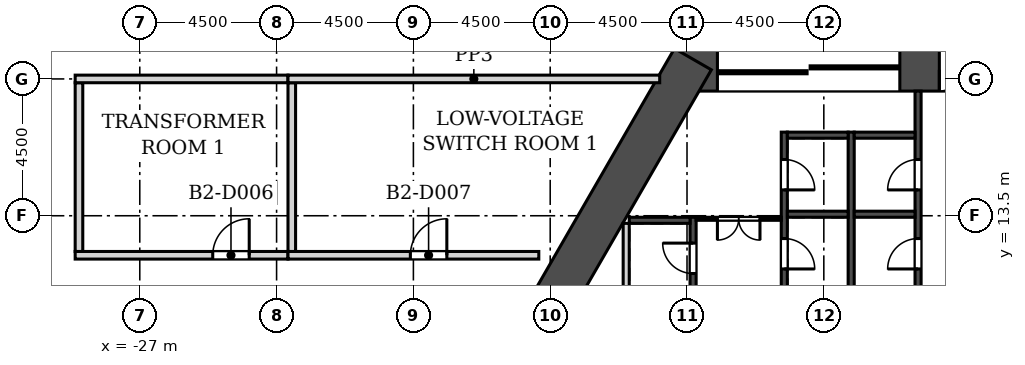
"""IFC4 building model, lengths in metres.
Left out: names, types, materials, properties, quantities, classifications, styles, units other than length and angle.
Written with IfcOpenShell. Run it as: python <this file> out.ifc"""

import sys

from ifc_helpers import new_model, si_unit, direction, frame, frame_2d, origin, place, context, subcontext, project, spatial, rectangle, extrude, element, fill, save


model = new_model("IFC4")
c1 = context("Model", 3, precision=1e-05, world=origin(), true_north=direction((0.0, 1.0)))
c2 = subcontext(c1, "Body", "Model", "MODEL_VIEW")
j1 = project(units=[si_unit("LENGTHUNIT", "METRE"), si_unit("PLANEANGLEUNIT", "RADIAN")], contexts=[c1])
p1 = place(None, origin())
s1 = spatial("IfcSite", under=j1, at=p1, CompositionType="ELEMENT")
p2 = place(p1, origin())
s2 = spatial("IfcBuilding", under=s1, at=p2, CompositionType="ELEMENT")
p3 = place(p2, frame((0.0, 0.0, -14.0)))
s3 = spatial("IfcBuildingStorey", under=s2, at=p3, CompositionType="ELEMENT", Elevation=-14.0)
p4 = place(p3, frame((-4.856, 74.528, -0.4), z_axis=(0.0, 0.0, 1.0), x_axis=(-0.499999312333, -0.866025800809, 0.0)))
e1 = element("IfcWall", 1, at=p4, inside=s3, PredefinedType="SOLIDWALL", context=c2, shape_type="SweptSolid", body=[
    extrude(rectangle(XDim=76.231, YDim=0.6, at=frame_2d((38.115, 0.0))), origin(), (0.0, 0.0, 1.0), 6.4),
])
p5 = place(p3, frame((9.412, 18.3, 0.0), z_axis=(0.0, 0.0, 1.0), x_axis=(-1.0, 0.0, 0.0)))
e2 = element("IfcWall", 2, at=p5, inside=s3, PredefinedType="SHEAR", context=c2, shape_type="SweptSolid", body=[
    extrude(rectangle(XDim=18.823, YDim=1.4, at=frame_2d((9.412, 0.0))), origin(), (0.0, 0.0, 1.0), 6.0),
])
p6 = place(p5, frame((8.711, 0.0, 0.0)))
e3 = element("IfcOpeningElement", 3, at=p6, cuts=e2, PredefinedType="OPENING", context=c2, shape_type="SweptSolid", body=[
    extrude(rectangle(XDim=1.4, YDim=2.1, at=frame_2d((0.7, 1.05))), frame((0.0, 0.71, 0.0), z_axis=(0.0, -1.0, 0.0), x_axis=(1.0, 0.0, 0.0)), (0.0, 0.0, 1.0), 1.42),
])
p7 = place(p5, frame((11.412, 0.0, 0.0)))
e4 = element("IfcOpeningElement", 4, at=p7, cuts=e2, PredefinedType="OPENING", context=c2, shape_type="SweptSolid", body=[
    extrude(rectangle(XDim=6.0, YDim=2.4, at=frame_2d((3.0, 1.2))), frame((0.0, 0.71, 0.0), z_axis=(0.0, -1.0, 0.0), x_axis=(1.0, 0.0, 0.0)), (0.0, 0.0, 1.0), 1.42),
])
p8 = place(p5, frame((1.412, 0.0, 0.0)))
e5 = element("IfcOpeningElement", 5, at=p8, cuts=e2, PredefinedType="OPENING", context=c2, shape_type="SweptSolid", body=[
    extrude(rectangle(XDim=6.0, YDim=2.4, at=frame_2d((3.0, 1.2))), frame((0.0, 0.71, 0.0), z_axis=(0.0, -1.0, 0.0), x_axis=(1.0, 0.0, 0.0)), (0.0, 0.0, 1.0), 1.42),
])
p9 = place(p3, frame((-8.805, 18.65, 0.0), z_axis=(0.0, 0.0, 1.0), x_axis=(-0.50000187635, -0.866024320471, 0.0)))
e6 = element("IfcWall", 6, at=p9, inside=s3, PredefinedType="SHEAR", context=c2, shape_type="SweptSolid", body=[
    extrude(rectangle(XDim=9.177, YDim=1.4, at=frame_2d((4.588, 0.0))), origin(), (0.0, 0.0, 1.0), 6.0),
])
p10 = place(p3, frame((-11.0, 5.85, 0.0), z_axis=(0.0, 0.0, 1.0), x_axis=(0.0, 1.0, 0.0)))
e7 = element("IfcWall", 7, at=p10, inside=s3, PredefinedType="SOLIDWALL", context=c2, shape_type="SweptSolid", body=[
    extrude(rectangle(XDim=7.4, YDim=0.2, at=frame_2d((3.7, 0.0))), origin(), (0.0, 0.0, 1.0), 5.65),
])
p11 = place(p3, frame((-8.8, 8.25, 0.0), z_axis=(0.0, 0.0, 1.0), x_axis=(0.0, 1.0, 0.0)))
e8 = element("IfcWall", 8, at=p11, inside=s3, PredefinedType="SOLIDWALL", context=c2, shape_type="SweptSolid", body=[
    extrude(rectangle(XDim=5.2, YDim=0.2, at=frame_2d((2.6, 0.0))), origin(), (0.0, 0.0, 1.0), 5.65),
])
p12 = place(p11, frame((0.85, 0.0, 0.0)))
e9 = element("IfcOpeningElement", 9, at=p12, cuts=e8, PredefinedType="OPENING", context=c2, shape_type="SweptSolid", body=[
    extrude(rectangle(XDim=1.0, YDim=2.1, at=frame_2d((0.5, 1.05))), frame((0.0, 0.11, 0.0), z_axis=(0.0, -1.0, 0.0), x_axis=(1.0, 0.0, 0.0)), (0.0, 0.0, 1.0), 0.22),
])
p13 = place(p11, frame((3.35, 0.0, 0.0)))
e10 = element("IfcOpeningElement", 10, at=p13, cuts=e8, PredefinedType="OPENING", context=c2, shape_type="SweptSolid", body=[
    extrude(rectangle(XDim=1.0, YDim=2.1, at=frame_2d((0.5, 1.05))), frame((0.0, 0.11, 0.0), z_axis=(0.0, -1.0, 0.0), x_axis=(1.0, 0.0, 0.0)), (0.0, 0.0, 1.0), 0.22),
])
p14 = place(p3, frame((-5.8, 8.25, 0.0), z_axis=(0.0, 0.0, 1.0), x_axis=(0.0, 1.0, 0.0)))
e11 = element("IfcWall", 11, at=p14, inside=s3, PredefinedType="SOLIDWALL", context=c2, shape_type="SweptSolid", body=[
    extrude(rectangle(XDim=8.0, YDim=0.2, at=frame_2d((4.0, 0.0))), origin(), (0.0, 0.0, 1.0), 5.65),
])
p15 = place(p14, frame((0.9, 0.0, 0.0)))
e12 = element("IfcOpeningElement", 12, at=p15, cuts=e11, PredefinedType="OPENING", context=c2, shape_type="SweptSolid", body=[
    extrude(rectangle(XDim=1.0, YDim=2.1, at=frame_2d((0.5, 1.05))), frame((0.0, 0.11, 0.0), z_axis=(0.0, -1.0, 0.0), x_axis=(1.0, 0.0, 0.0)), (0.0, 0.0, 1.0), 0.22),
])
p16 = place(p14, frame((3.5, 0.0, 0.0)))
e13 = element("IfcOpeningElement", 13, at=p16, cuts=e11, PredefinedType="OPENING", context=c2, shape_type="SweptSolid", body=[
    extrude(rectangle(XDim=1.0, YDim=2.1, at=frame_2d((0.5, 1.05))), frame((0.0, 0.11, 0.0), z_axis=(0.0, -1.0, 0.0), x_axis=(1.0, 0.0, 0.0)), (0.0, 0.0, 1.0), 0.22),
])
p17 = place(p14, frame((6.1, 0.0, 0.0)))
e14 = element("IfcOpeningElement", 14, at=p17, cuts=e11, PredefinedType="OPENING", context=c2, shape_type="SweptSolid", body=[
    extrude(rectangle(XDim=1.0, YDim=2.1, at=frame_2d((0.5, 1.05))), frame((0.0, 0.11, 0.0), z_axis=(0.0, -1.0, 0.0), x_axis=(1.0, 0.0, 0.0)), (0.0, 0.0, 1.0), 0.22),
])
p18 = place(p3, frame((-3.6, 8.45, 0.0), z_axis=(0.0, 0.0, 1.0), x_axis=(0.0, 1.0, 0.0)))
e15 = element("IfcWall", 15, at=p18, inside=s3, PredefinedType="SOLIDWALL", context=c2, shape_type="SweptSolid", body=[
    extrude(rectangle(XDim=7.8, YDim=0.2, at=frame_2d((3.9, 0.0))), origin(), (0.0, 0.0, 1.0), 5.65),
])
p19 = place(p3, frame((-1.4, 5.85, 0.0), z_axis=(0.0, 0.0, 1.0), x_axis=(0.0, 1.0, 0.0)))
e16 = element("IfcWall", 16, at=p19, inside=s3, PredefinedType="SOLIDWALL", context=c2, shape_type="SweptSolid", body=[
    extrude(rectangle(XDim=11.75, YDim=0.2, at=frame_2d((5.875, 0.0))), origin(), (0.0, 0.0, 1.0), 5.65),
])
p20 = place(p19, frame((0.65, 0.0, 0.0)))
e17 = element("IfcOpeningElement", 17, at=p20, cuts=e16, PredefinedType="OPENING", context=c2, shape_type="SweptSolid", body=[
    extrude(rectangle(XDim=1.1, YDim=2.1, at=frame_2d((0.55, 1.05))), frame((0.0, 0.11, 0.0), z_axis=(0.0, -1.0, 0.0), x_axis=(1.0, 0.0, 0.0)), (0.0, 0.0, 1.0), 0.22),
])
p21 = place(p19, frame((3.3, 0.0, 0.0)))
e18 = element("IfcOpeningElement", 18, at=p21, cuts=e16, PredefinedType="OPENING", context=c2, shape_type="SweptSolid", body=[
    extrude(rectangle(XDim=1.0, YDim=2.1, at=frame_2d((0.5, 1.05))), frame((0.0, 0.11, 0.0), z_axis=(0.0, -1.0, 0.0), x_axis=(1.0, 0.0, 0.0)), (0.0, 0.0, 1.0), 0.22),
])
p22 = place(p19, frame((5.9, 0.0, 0.0)))
e19 = element("IfcOpeningElement", 19, at=p22, cuts=e16, PredefinedType="OPENING", context=c2, shape_type="SweptSolid", body=[
    extrude(rectangle(XDim=1.0, YDim=2.1, at=frame_2d((0.5, 1.05))), frame((0.0, 0.11, 0.0), z_axis=(0.0, -1.0, 0.0), x_axis=(1.0, 0.0, 0.0)), (0.0, 0.0, 1.0), 0.22),
])
p23 = place(p19, frame((8.5, 0.0, 0.0)))
e20 = element("IfcOpeningElement", 20, at=p23, cuts=e16, PredefinedType="OPENING", context=c2, shape_type="SweptSolid", body=[
    extrude(rectangle(XDim=1.0, YDim=2.1, at=frame_2d((0.5, 1.05))), frame((0.0, 0.11, 0.0), z_axis=(0.0, -1.0, 0.0), x_axis=(1.0, 0.0, 0.0)), (0.0, 0.0, 1.0), 0.22),
])
for number, where, z_axis, x_axis in (
    (21, (-10.9, 13.35, 0.0), (0.0, 0.0, 1.0), (1.0, 0.0, 0.0)),
    (22, (-5.7, 13.55, 0.0), (0.0, 0.0, 1.0), (1.0, 0.0, 0.0)),
    (23, (-5.7, 16.15, 0.0), (0.0, 0.0, 1.0), (1.0, 0.0, 0.0)),
    (24, (-3.5, 13.55, 0.0), (0.0, 0.0, 1.0), (1.0, 0.0, 0.0)),
    (25, (-3.5, 16.15, 0.0), (0.0, 0.0, 1.0), (1.0, 0.0, 0.0)),
):
    element("IfcWall", number, at=place(p3, frame(where, z_axis=z_axis, x_axis=x_axis)), inside=s3, PredefinedType="SOLIDWALL", context=c2, shape_type="SweptSolid", body=[
        extrude(rectangle(XDim=2.0, YDim=0.2, at=frame_2d((1.0, 0.0))), origin(), (0.0, 0.0, 1.0), 5.65),
    ])
p24 = place(p3, frame((-8.7, 13.4, 0.0), z_axis=(0.0, 0.0, 1.0), x_axis=(1.0, 0.0, 0.0)))
e26 = element("IfcWall", 26, at=p24, inside=s3, PredefinedType="PARTITIONING", context=c2, shape_type="SweptSolid", body=[
    extrude(rectangle(XDim=2.8, YDim=0.1, at=frame_2d((1.4, 0.0))), origin(), (0.0, 0.0, 1.0), 5.65),
])
p25 = place(p24, frame((0.7, 0.0, 0.0)))
e27 = element("IfcOpeningElement", 27, at=p25, cuts=e26, PredefinedType="OPENING", context=c2, shape_type="SweptSolid", body=[
    extrude(rectangle(XDim=1.4, YDim=2.1, at=frame_2d((0.7, 1.05))), frame((0.0, 0.06, 0.0), z_axis=(0.0, -1.0, 0.0), x_axis=(1.0, 0.0, 0.0)), (0.0, 0.0, 1.0), 0.12),
])
p26 = place(p3, frame((-29.125, 12.2, 0.0), z_axis=(0.0, 0.0, 1.0), x_axis=(1.0, 0.0, 0.0)))
e28 = element("IfcWall", 28, at=p26, inside=s3, PredefinedType="SOLIDWALL", context=c2, shape_type="SweptSolid", body=[
    extrude(rectangle(XDim=7.0, YDim=0.25, at=frame_2d((3.5, 0.0))), origin(), (0.0, 0.0, 1.0), 5.65),
])
p27 = place(p26, frame((4.525, 0.0, 0.0)))
e29 = element("IfcOpeningElement", 29, at=p27, cuts=e28, PredefinedType="OPENING", context=c2, shape_type="SweptSolid", body=[
    extrude(rectangle(XDim=1.2, YDim=2.1, at=frame_2d((0.6, 1.05))), frame((0.0, 0.135, 0.0), z_axis=(0.0, -1.0, 0.0), x_axis=(1.0, 0.0, 0.0)), (0.0, 0.0, 1.0), 0.27),
])
p28 = place(p3, frame((-22.125, 12.2, 0.0), z_axis=(0.0, 0.0, 1.0), x_axis=(1.0, 0.0, 0.0)))
e30 = element("IfcWall", 30, at=p28, inside=s3, PredefinedType="SOLIDWALL", context=c2, shape_type="SweptSolid", body=[
    extrude(rectangle(XDim=8.25, YDim=0.25, at=frame_2d((4.125, 0.0))), origin(), (0.0, 0.0, 1.0), 5.65),
])
p29 = place(p28, frame((4.025, 0.0, 0.0)))
e31 = element("IfcOpeningElement", 31, at=p29, cuts=e30, PredefinedType="OPENING", context=c2, shape_type="SweptSolid", body=[
    extrude(rectangle(XDim=1.2, YDim=2.1, at=frame_2d((0.6, 1.05))), frame((0.0, 0.135, 0.0), z_axis=(0.0, -1.0, 0.0), x_axis=(1.0, 0.0, 0.0)), (0.0, 0.0, 1.0), 0.27),
])
for number, where, z_axis, x_axis in (
    (32, (-29.0, 17.875, 0.0), (0.0, 0.0, 1.0), (0.0, -1.0, 0.0)),
    (33, (-22.0, 17.875, 0.0), (0.0, 0.0, 1.0), (0.0, -1.0, 0.0)),
):
    element("IfcWall", number, at=place(p3, frame(where, z_axis=z_axis, x_axis=x_axis)), inside=s3, PredefinedType="SOLIDWALL", context=c2, shape_type="SweptSolid", body=[
        extrude(rectangle(XDim=5.55, YDim=0.25, at=frame_2d((2.775, 0.0))), origin(), (0.0, 0.0, 1.0), 5.65),
    ])
p30 = place(p3, frame((-22.125, 18.0, 0.0), z_axis=(0.0, 0.0, 1.0), x_axis=(-1.0, 0.0, 0.0)))
e34 = element("IfcWall", 34, at=p30, inside=s3, PredefinedType="SOLIDWALL", context=c2, shape_type="SweptSolid", body=[
    extrude(rectangle(XDim=7.0, YDim=0.25, at=frame_2d((3.5, 0.0))), origin(), (0.0, 0.0, 1.0), 5.65),
])
p31 = place(p3, frame((-9.898, 18.0, 0.0), z_axis=(0.0, 0.0, 1.0), x_axis=(-1.0, 0.0, 0.0)))
e35 = element("IfcWall", 35, at=p31, inside=s3, PredefinedType="SOLIDWALL", context=c2, shape_type="SweptSolid", body=[
    extrude(rectangle(XDim=12.227, YDim=0.25, at=frame_2d((6.113, 0.0))), origin(), (0.0, 0.0, 1.0), 5.65),
])
p32 = place(p13, origin())
e36 = element("IfcDoor", 36, at=p32, inside=s3, OperationType="SINGLE_SWING_RIGHT", PredefinedType="DOOR", context=c2, shape_type="SweptSolid", body=[
    extrude(rectangle(XDim=1.0, YDim=2.1, at=frame_2d((0.5, 1.05))), frame((0.0, 0.025, 0.0), z_axis=(0.0, -1.0, 0.0), x_axis=(1.0, 0.0, 0.0)), (0.0, 0.0, 1.0), 0.05),
])
fill(e10, e36)
p33 = place(p16, frame((1.0, 0.0, 0.0), z_axis=(0.0, 0.0, 1.0), x_axis=(-1.0, 0.0, 0.0)))
e37 = element("IfcDoor", 37, at=p33, inside=s3, OperationType="SINGLE_SWING_RIGHT", PredefinedType="DOOR", context=c2, shape_type="SweptSolid", body=[
    extrude(rectangle(XDim=1.0, YDim=2.1, at=frame_2d((0.5, 1.05))), frame((0.0, 0.025, 0.0), z_axis=(0.0, -1.0, 0.0), x_axis=(1.0, 0.0, 0.0)), (0.0, 0.0, 1.0), 0.05),
])
fill(e13, e37)
p34 = place(p17, frame((1.0, 0.0, 0.0), z_axis=(0.0, 0.0, 1.0), x_axis=(-1.0, 0.0, 0.0)))
e38 = element("IfcDoor", 38, at=p34, inside=s3, OperationType="SINGLE_SWING_RIGHT", PredefinedType="DOOR", context=c2, shape_type="SweptSolid", body=[
    extrude(rectangle(XDim=1.0, YDim=2.1, at=frame_2d((0.5, 1.05))), frame((0.0, 0.025, 0.0), z_axis=(0.0, -1.0, 0.0), x_axis=(1.0, 0.0, 0.0)), (0.0, 0.0, 1.0), 0.05),
])
fill(e14, e38)
p35 = place(p22, origin())
e39 = element("IfcDoor", 39, at=p35, inside=s3, OperationType="SINGLE_SWING_LEFT", PredefinedType="DOOR", context=c2, shape_type="SweptSolid", body=[
    extrude(rectangle(XDim=1.0, YDim=2.1, at=frame_2d((0.5, 1.05))), frame((0.0, 0.025, 0.0), z_axis=(0.0, -1.0, 0.0), x_axis=(1.0, 0.0, 0.0)), (0.0, 0.0, 1.0), 0.05),
])
fill(e19, e39)
p36 = place(p23, origin())
e40 = element("IfcDoor", 40, at=p36, inside=s3, OperationType="SINGLE_SWING_LEFT", PredefinedType="DOOR", context=c2, shape_type="SweptSolid", body=[
    extrude(rectangle(XDim=1.0, YDim=2.1, at=frame_2d((0.5, 1.05))), frame((0.0, 0.025, 0.0), z_axis=(0.0, -1.0, 0.0), x_axis=(1.0, 0.0, 0.0)), (0.0, 0.0, 1.0), 0.05),
])
fill(e20, e40)
p37 = place(p25, frame((1.4, 0.0, 0.0), z_axis=(0.0, 0.0, 1.0), x_axis=(-1.0, 0.0, 0.0)))
e41 = element("IfcDoor", 41, at=p37, inside=s3, OperationType="DOUBLE_DOOR_SINGLE_SWING", PredefinedType="DOOR", context=c2, shape_type="SweptSolid", body=[
    extrude(rectangle(XDim=1.4, YDim=2.1, at=frame_2d((0.7, 1.05))), frame((0.0, 0.025, 0.0), z_axis=(0.0, -1.0, 0.0), x_axis=(1.0, 0.0, 0.0)), (0.0, 0.0, 1.0), 0.05),
])
fill(e27, e41)
p38 = place(p6, origin())
e42 = element("IfcDoor", 42, at=p38, inside=s3, OperationType="DOUBLE_DOOR_SINGLE_SWING", PredefinedType="DOOR", context=c2, shape_type="SweptSolid", body=[
    extrude(rectangle(XDim=1.4, YDim=2.1, at=frame_2d((0.7, 1.05))), frame((0.0, 0.025, 0.0), z_axis=(0.0, -1.0, 0.0), x_axis=(1.0, 0.0, 0.0)), (0.0, 0.0, 1.0), 0.05),
])
fill(e3, e42)
p39 = place(p7, origin())
e43 = element("IfcDoor", 43, at=p39, inside=s3, OperationType="DOUBLE_DOOR_SLIDING", PredefinedType="DOOR", context=c2, shape_type="SweptSolid", body=[
    extrude(rectangle(XDim=6.0, YDim=2.4, at=frame_2d((3.0, 1.2))), frame((0.0, 0.025, 0.0), z_axis=(0.0, -1.0, 0.0), x_axis=(1.0, 0.0, 0.0)), (0.0, 0.0, 1.0), 0.05),
])
fill(e4, e43)
p40 = place(p27, origin())
e44 = element("IfcDoor", 44, at=p40, inside=s3, OperationType="SINGLE_SWING_RIGHT", PredefinedType="DOOR", context=c2, shape_type="SweptSolid", body=[
    extrude(rectangle(XDim=1.2, YDim=2.1, at=frame_2d((0.6, 1.05))), frame((0.0, 0.025, 0.0), z_axis=(0.0, -1.0, 0.0), x_axis=(1.0, 0.0, 0.0)), (0.0, 0.0, 1.0), 0.05),
])
fill(e29, e44)
p41 = place(p29, origin())
e45 = element("IfcDoor", 45, at=p41, inside=s3, OperationType="SINGLE_SWING_RIGHT", PredefinedType="DOOR", context=c2, shape_type="SweptSolid", body=[
    extrude(rectangle(XDim=1.2, YDim=2.1, at=frame_2d((0.6, 1.05))), frame((0.0, 0.025, 0.0), z_axis=(0.0, -1.0, 0.0), x_axis=(1.0, 0.0, 0.0)), (0.0, 0.0, 1.0), 0.05),
])
fill(e31, e45)
save(model, sys.argv[1])
